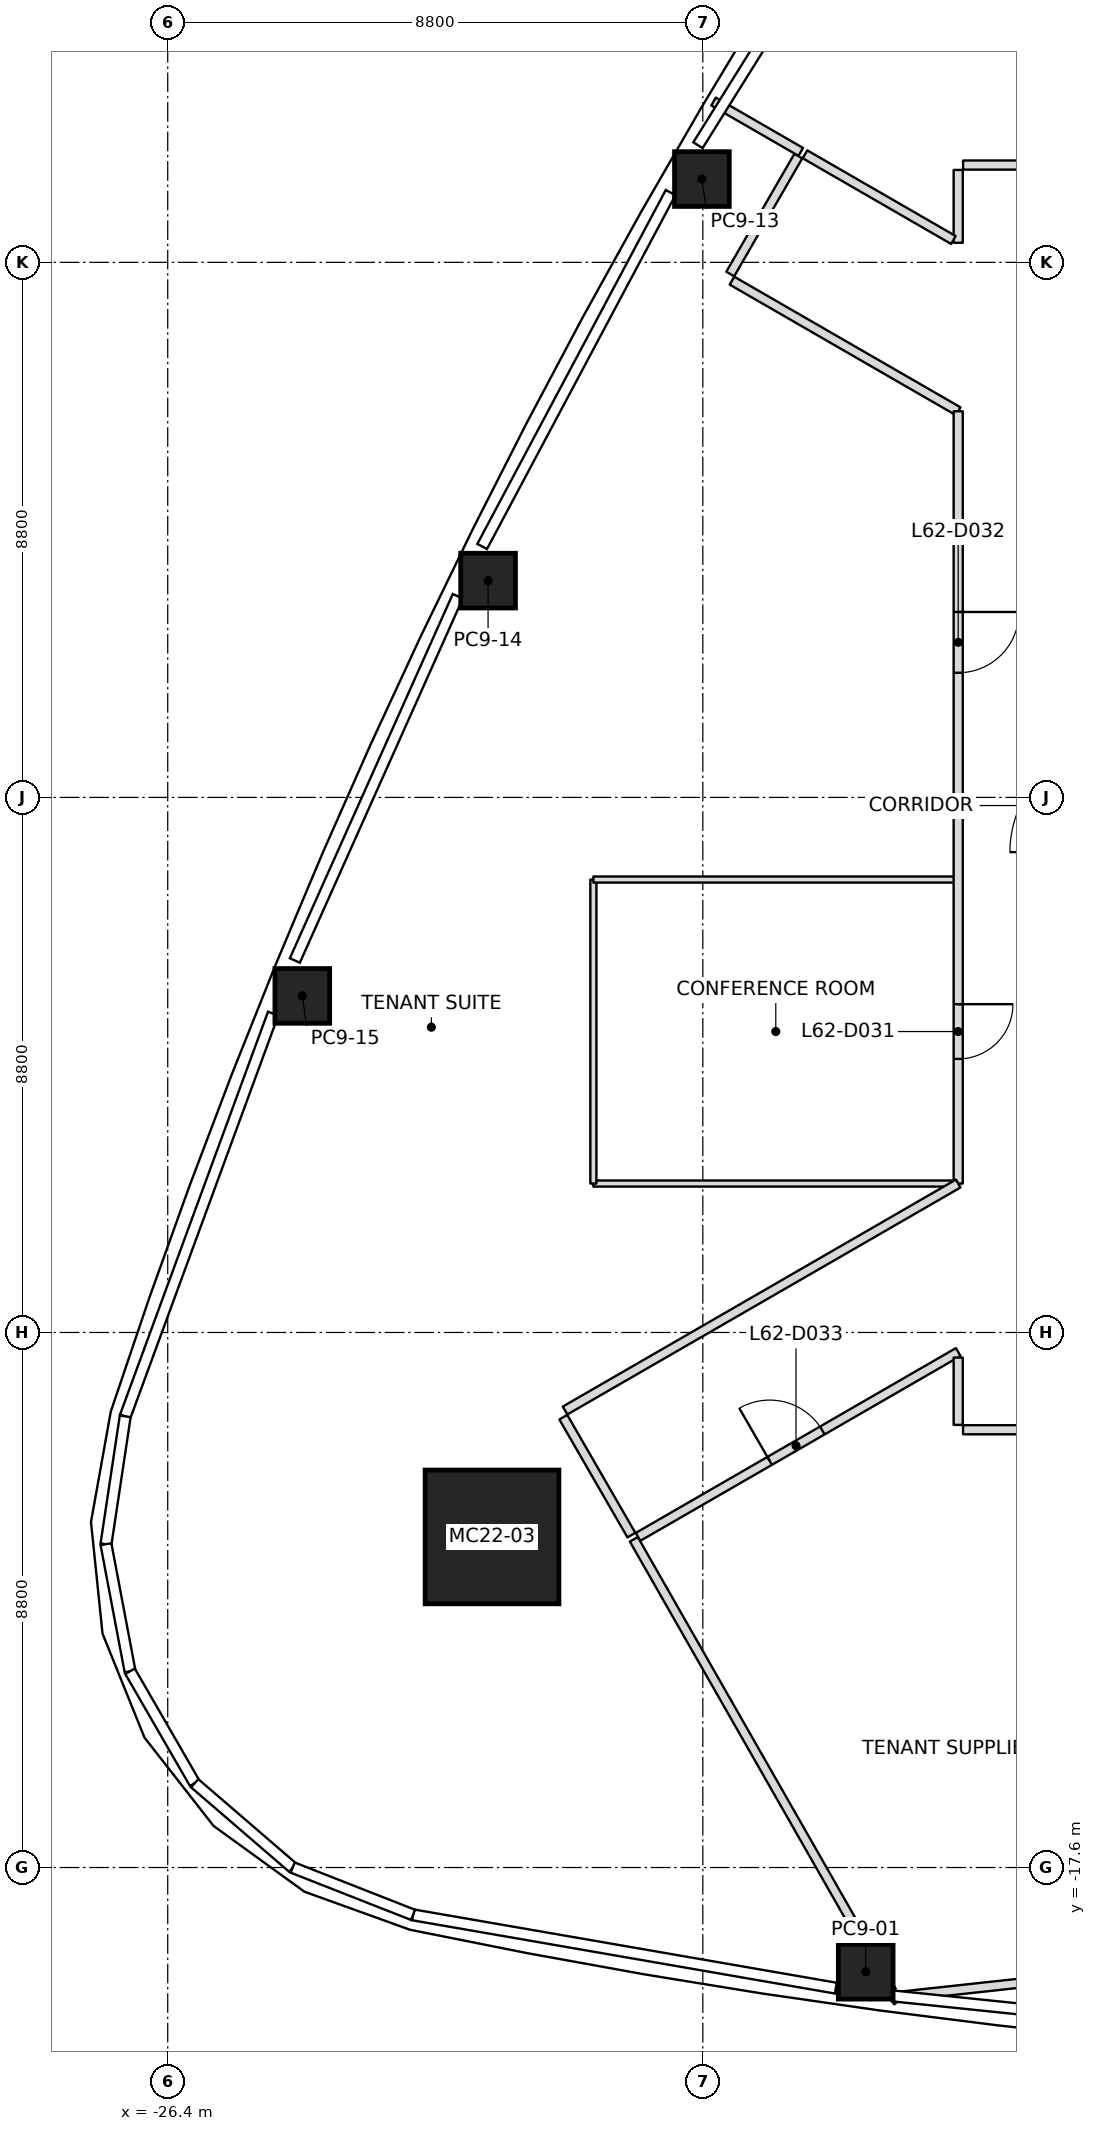
"""IFC4 building model, lengths in metres.
Left out: names, types, materials, properties, quantities, classifications, styles, units other than length and angle.
Written with IfcOpenShell. Run it as: python <this file> out.ifc"""

import sys

from ifc_helpers import new_model, si_unit, direction, frame, frame_2d, origin, origin_2d, place, context, subcontext, project, spatial, rectangle, extrude, element, fill, save


model = new_model("IFC4")
c1 = context("Model", 3, precision=1e-05, world=origin(), true_north=direction((0.0, 1.0)))
c2 = subcontext(c1, "Body", "Model", "MODEL_VIEW")
j1 = project(units=[si_unit("LENGTHUNIT", "METRE"), si_unit("PLANEANGLEUNIT", "RADIAN")], contexts=[c1])
p1 = place(None, origin())
s1 = spatial("IfcSite", under=j1, at=p1, CompositionType="ELEMENT")
p2 = place(p1, origin())
s2 = spatial("IfcBuilding", under=s1, at=p2, CompositionType="ELEMENT")
p3 = place(p2, frame((0.0, 0.0, 275.0)))
s3 = spatial("IfcBuildingStorey", under=s2, at=p3, CompositionType="ELEMENT", Elevation=275.0)
p4 = place(p3, frame((-21.067, -12.163, 0.0), z_axis=(0.027756720281, 0.01604399436, 0.999485945236), x_axis=(0.999614708015, -0.000445500311, -0.027753144871)))
e1 = element("IfcColumn", 1, at=p4, inside=s3, PredefinedType="COLUMN", context=c2, shape_type="SweptSolid", body=[
    extrude(rectangle(XDim=2.2, YDim=2.2, at=origin_2d()), origin(), (0.0, 0.0, 1.0), 4.002),
])
p5 = place(p3, frame((-14.921, -19.314, 0.0), z_axis=(0.017452456582, 0.010373837829, 0.999793876381), x_axis=(-0.990437350176, 0.137047764471, 0.015867124157)))
e2 = element("IfcColumn", 2, at=p5, inside=s3, PredefinedType="COLUMN", context=c2, shape_type="SweptSolid", body=[
    extrude(rectangle(XDim=0.9, YDim=0.9, at=origin_2d()), origin(), (0.0, 0.0, 1.0), 4.001),
])
p6 = place(p3, frame((-17.615, 10.17, 0.0), z_axis=(0.009887052741, -0.005675900648, 0.999935013058), x_axis=(0.49997556095, 0.866039512773, -2.7732311e-05)))
e3 = element("IfcColumn", 3, at=p6, inside=s3, PredefinedType="COLUMN", context=c2, shape_type="SweptSolid", body=[
    extrude(rectangle(XDim=0.9, YDim=0.9, at=origin_2d()), origin(), (0.0, 0.0, 1.0), 4.0),
])
p7 = place(p3, frame((-21.132, 3.565, 0.0), z_axis=(0.014036674448, 0.002013957638, 0.999899452818), x_axis=(0.4393691729, 0.898271169946, -0.007977164207)))
e4 = element("IfcColumn", 4, at=p7, inside=s3, PredefinedType="COLUMN", context=c2, shape_type="SweptSolid", body=[
    extrude(rectangle(XDim=0.9, YDim=0.9, at=origin_2d()), origin(), (0.0, 0.0, 1.0), 4.0),
])
p8 = place(p3, frame((-24.187, -3.265, 0.0), z_axis=(0.017757561888, 0.00988565301, 0.999793450099), x_axis=(0.376696820027, 0.926201019162, -0.015848592513)))
e5 = element("IfcColumn", 5, at=p8, inside=s3, PredefinedType="COLUMN", context=c2, shape_type="SweptSolid", body=[
    extrude(rectangle(XDim=0.9, YDim=0.9, at=origin_2d()), origin(), (0.0, 0.0, 1.0), 4.001),
])
p9 = place(p3, frame((-18.735, -12.202, 0.0), z_axis=(0.0, 0.0, 1.0), x_axis=(0.495972918393, -0.868337989622, 0.0)))
e6 = element("IfcWall", 6, at=p9, inside=s3, PredefinedType="PARTITIONING", context=c2, shape_type="SweptSolid", body=[
    extrude(rectangle(XDim=8.552, YDim=0.15, at=frame_2d((4.276, 0.0))), origin(), (0.0, 0.0, 1.0), 3.45),
])
p10 = place(p3, frame((-15.989, 10.617, 0.0), z_axis=(0.0, 0.0, 1.0), x_axis=(-0.865984256307, 0.50007126275, 0.0)))
e7 = element("IfcWall", 7, at=p10, inside=s3, PredefinedType="PARTITIONING", context=c2, shape_type="SweptSolid", body=[
    extrude(rectangle(XDim=1.656, YDim=0.15, at=frame_2d((0.828, 0.0))), origin(), (0.0, 0.0, 1.0), 3.234),
])
p11 = place(p3, frame((-9.2, -19.156, 0.0), z_axis=(0.0, 0.0, 1.0), x_axis=(-0.994133216404, -0.108162600019, 0.0)))
e8 = element("IfcWall", 8, at=p11, inside=s3, PredefinedType="PARTITIONING", context=c2, shape_type="SweptSolid", body=[
    extrude(rectangle(XDim=5.173, YDim=0.15, at=frame_2d((2.587, 0.0))), origin(), (0.0, 0.0, 1.0), 3.234),
])
p12 = place(p3, frame((-14.393, -19.802, 0.0), z_axis=(0.0, 0.0, 1.0), x_axis=(-0.639087334009, 0.769134175232, 0.0)))
e9 = element("IfcWall", 9, at=p12, inside=s3, PredefinedType="PARTITIONING", context=c2, shape_type="SweptSolid", body=[
    extrude(rectangle(XDim=0.197, YDim=0.15, at=frame_2d((0.099, 0.0))), origin(), (0.0, 0.0, 1.0), 3.45),
])
p13 = place(p3, frame((-19.895, -10.193, 0.0), z_axis=(0.0, 0.0, 1.0), x_axis=(0.49994888933, -0.866054910533, 0.0)))
e10 = element("IfcWall", 10, at=p13, inside=s3, PredefinedType="PARTITIONING", context=c2, shape_type="SweptSolid", body=[
    extrude(rectangle(XDim=2.24, YDim=0.15, at=frame_2d((1.12, 0.0))), origin(), (0.0, 0.0, 1.0), 3.233),
])
p14 = place(p3, frame((-17.12, 8.499, 0.0), z_axis=(0.0, 0.0, 1.0), x_axis=(0.866041729639, -0.499971721724, 0.0)))
e11 = element("IfcWall", 11, at=p14, inside=s3, PredefinedType="PARTITIONING", context=c2, shape_type="SweptSolid", body=[
    extrude(rectangle(XDim=4.296, YDim=0.15, at=frame_2d((2.148, 0.0))), origin(), (0.0, 0.0, 1.0), 3.45),
])
p15 = place(p3, frame((-13.4, 6.351, 0.0), z_axis=(0.0, 0.0, 1.0), x_axis=(0.0, -1.0, 0.0)))
e12 = element("IfcWall", 12, at=p15, inside=s3, PredefinedType="PARTITIONING", context=c2, shape_type="SweptSolid", body=[
    extrude(rectangle(XDim=12.702, YDim=0.15, at=frame_2d((6.351, 0.0))), origin(), (0.0, 0.0, 1.0), 3.317),
])
p16 = place(p15, frame((9.752, 0.0, 0.0)))
e13 = element("IfcOpeningElement", 13, at=p16, cuts=e12, PredefinedType="OPENING", context=c2, shape_type="SweptSolid", body=[
    extrude(rectangle(XDim=0.9, YDim=2.1, at=frame_2d((0.45, 1.05))), frame((0.0, 0.075, 0.0), z_axis=(0.0, -1.0, 0.0), x_axis=(1.0, 0.0, 0.0)), (0.0, 0.0, 1.0), 0.15),
])
p17 = place(p15, frame((3.301, 0.0, 0.0)))
e14 = element("IfcOpeningElement", 14, at=p17, cuts=e12, PredefinedType="OPENING", context=c2, shape_type="SweptSolid", body=[
    extrude(rectangle(XDim=1.0, YDim=2.1, at=frame_2d((0.5, 1.05))), frame((0.0, 0.075, 0.0), z_axis=(0.0, -1.0, 0.0), x_axis=(1.0, 0.0, 0.0)), (0.0, 0.0, 1.0), 0.15),
])
p18 = place(p3, frame((-13.4, -6.351, 0.0), z_axis=(0.0, 0.0, 1.0), x_axis=(-0.86603092396, -0.499990438654, 0.0)))
e15 = element("IfcWall", 15, at=p18, inside=s3, PredefinedType="PARTITIONING", context=c2, shape_type="SweptSolid", body=[
    extrude(rectangle(XDim=7.466, YDim=0.15, at=frame_2d((3.733, 0.0))), origin(), (0.0, 0.0, 1.0), 3.317),
])
p19 = place(p3, frame((-18.665, -12.162, 0.0), z_axis=(0.0, 0.0, 1.0), x_axis=(0.866020417952, 0.500008635616, 0.0)))
e16 = element("IfcWall", 16, at=p19, inside=s3, PredefinedType="PARTITIONING", context=c2, shape_type="SweptSolid", body=[
    extrude(rectangle(XDim=6.08, YDim=0.15, at=frame_2d((3.04, 0.0))), origin(), (0.0, 0.0, 1.0), 3.233),
])
p20 = place(p19, frame((2.5, 0.0, 0.0)))
e17 = element("IfcOpeningElement", 17, at=p20, cuts=e16, PredefinedType="OPENING", context=c2, shape_type="SweptSolid", body=[
    extrude(rectangle(XDim=1.0, YDim=2.1, at=frame_2d((0.5, 1.05))), frame((0.0, 0.075, 0.0), z_axis=(0.0, -1.0, 0.0), x_axis=(1.0, 0.0, 0.0)), (0.0, 0.0, 1.0), 0.15),
])
p21 = place(p3, frame((-13.4, -9.214, 0.0), z_axis=(0.0, 0.0, 1.0), x_axis=(0.0, -1.0, 0.0)))
e18 = element("IfcWall", 18, at=p21, inside=s3, PredefinedType="PARTITIONING", context=c2, shape_type="SweptSolid", body=[
    extrude(rectangle(XDim=1.106, YDim=0.15, at=frame_2d((0.553, 0.0))), origin(), (0.0, 0.0, 1.0), 3.233),
])
p22 = place(p3, frame((-16.029, 10.548, 0.0), z_axis=(0.0, 0.0, 1.0), x_axis=(-0.49994888933, -0.866054910533, 0.0)))
e19 = element("IfcWall", 19, at=p22, inside=s3, PredefinedType="PARTITIONING", context=c2, shape_type="SweptSolid", body=[
    extrude(rectangle(XDim=2.24, YDim=0.15, at=frame_2d((1.12, 0.0))), origin(), (0.0, 0.0, 1.0), 3.45),
])
p23 = place(p3, frame((-13.4, 10.32, 0.0), z_axis=(0.0, 0.0, 1.0), x_axis=(0.0, -1.0, 0.0)))
e20 = element("IfcWall", 20, at=p23, inside=s3, PredefinedType="PARTITIONING", context=c2, shape_type="SweptSolid", body=[
    extrude(rectangle(XDim=1.198, YDim=0.15, at=frame_2d((0.599, 0.0))), origin(), (0.0, 0.0, 1.0), 3.45),
])
p24 = place(p3, frame((-13.479, 9.168, 0.0), z_axis=(0.0, 0.0, 1.0), x_axis=(-0.866054311015, 0.499949927865, 0.0)))
e21 = element("IfcWall", 21, at=p24, inside=s3, PredefinedType="PARTITIONING", context=c2, shape_type="SweptSolid", body=[
    extrude(rectangle(XDim=2.818, YDim=0.15, at=frame_2d((1.409, 0.0))), origin(), (0.0, 0.0, 1.0), 3.45),
])
p25 = place(p3, frame((-13.32, -10.4, 0.0), z_axis=(0.0, 0.0, 1.0), x_axis=(1.0, 0.0, 0.0)))
e22 = element("IfcWall", 22, at=p25, inside=s3, PredefinedType="PARTITIONING", context=c2, shape_type="SweptSolid", body=[
    extrude(rectangle(XDim=12.12, YDim=0.15, at=frame_2d((6.06, 0.0))), origin(), (0.0, 0.0, 1.0), 3.317),
])
p26 = place(p3, frame((-1.2, 10.4, 0.0), z_axis=(0.0, 0.0, 1.0), x_axis=(-1.0, 0.0, 0.0)))
e23 = element("IfcWall", 23, at=p26, inside=s3, PredefinedType="PARTITIONING", context=c2, shape_type="SweptSolid", body=[
    extrude(rectangle(XDim=12.12, YDim=0.15, at=frame_2d((6.06, 0.0))), origin(), (0.0, 0.0, 1.0), 3.443),
])
p27 = place(p26, frame((1.65, 0.0, 0.0)))
e24 = element("IfcOpeningElement", 24, at=p27, cuts=e23, PredefinedType="OPENING", context=c2, shape_type="SweptSolid", body=[
    extrude(rectangle(XDim=0.9, YDim=2.1, at=frame_2d((0.45, 1.05))), frame((0.0, 0.075, 0.0), z_axis=(0.0, -1.0, 0.0), x_axis=(1.0, 0.0, 0.0)), (0.0, 0.0, 1.0), 0.15),
])
p28 = place(p26, frame((7.75, 0.0, 0.0)))
e25 = element("IfcOpeningElement", 25, at=p28, cuts=e23, PredefinedType="OPENING", context=c2, shape_type="SweptSolid", body=[
    extrude(rectangle(XDim=1.0, YDim=2.1, at=frame_2d((0.5, 1.05))), frame((0.0, 0.075, 0.0), z_axis=(0.0, -1.0, 0.0), x_axis=(1.0, 0.0, 0.0)), (0.0, 0.0, 1.0), 0.15),
])
p29 = place(p3, frame((-13.46, -6.351, 0.0), z_axis=(0.0, 0.0, 1.0), x_axis=(-1.0, 0.0, 0.0)))
e26 = element("IfcWall", 26, at=p29, inside=s3, PredefinedType="PARTITIONING", context=c2, shape_type="SweptSolid", body=[
    extrude(rectangle(XDim=5.94, YDim=0.1, at=frame_2d((2.97, 0.0))), origin(), (0.0, 0.0, 1.0), 3.317),
])
p30 = place(p3, frame((-19.4, -6.351, 0.0), z_axis=(0.0, 0.0, 1.0), x_axis=(0.0, 1.0, 0.0)))
e27 = element("IfcWall", 27, at=p30, inside=s3, PredefinedType="PARTITIONING", context=c2, shape_type="SweptSolid", body=[
    extrude(rectangle(XDim=5.0, YDim=0.1, at=frame_2d((2.5, 0.0))), origin(), (0.0, 0.0, 1.0), 3.317),
])
p31 = place(p3, frame((-19.4, -1.351, 0.0), z_axis=(0.0, 0.0, 1.0), x_axis=(1.0, 0.0, 0.0)))
e28 = element("IfcWall", 28, at=p31, inside=s3, PredefinedType="PARTITIONING", context=c2, shape_type="SweptSolid", body=[
    extrude(rectangle(XDim=5.97, YDim=0.1, at=frame_2d((2.985, 0.0))), origin(), (0.0, 0.0, 1.0), 3.317),
])
p32 = place(p16, origin())
e29 = element("IfcDoor", 29, at=p32, inside=s3, OperationType="SINGLE_SWING_LEFT", PredefinedType="DOOR", context=c2, shape_type="SweptSolid", body=[
    extrude(rectangle(XDim=0.9, YDim=2.1, at=frame_2d((0.45, 1.05))), frame((0.0, 0.025, 0.0), z_axis=(0.0, -1.0, 0.0), x_axis=(1.0, 0.0, 0.0)), (0.0, 0.0, 1.0), 0.05),
])
fill(e13, e29)
p33 = place(p17, origin())
e30 = element("IfcDoor", 30, at=p33, inside=s3, OperationType="SINGLE_SWING_LEFT", PredefinedType="DOOR", context=c2, shape_type="SweptSolid", body=[
    extrude(rectangle(XDim=1.0, YDim=2.1, at=frame_2d((0.5, 1.05))), frame((0.0, 0.025, 0.0), z_axis=(0.0, -1.0, 0.0), x_axis=(1.0, 0.0, 0.0)), (0.0, 0.0, 1.0), 0.05),
])
fill(e14, e30)
p34 = place(p20, origin())
e31 = element("IfcDoor", 31, at=p34, inside=s3, OperationType="SINGLE_SWING_LEFT", PredefinedType="DOOR", context=c2, shape_type="SweptSolid", body=[
    extrude(rectangle(XDim=1.0, YDim=2.1, at=frame_2d((0.5, 1.05))), frame((0.0, 0.025, 0.0), z_axis=(0.0, -1.0, 0.0), x_axis=(1.0, 0.0, 0.0)), (0.0, 0.0, 1.0), 0.05),
])
fill(e17, e31)
save(model, sys.argv[1])
